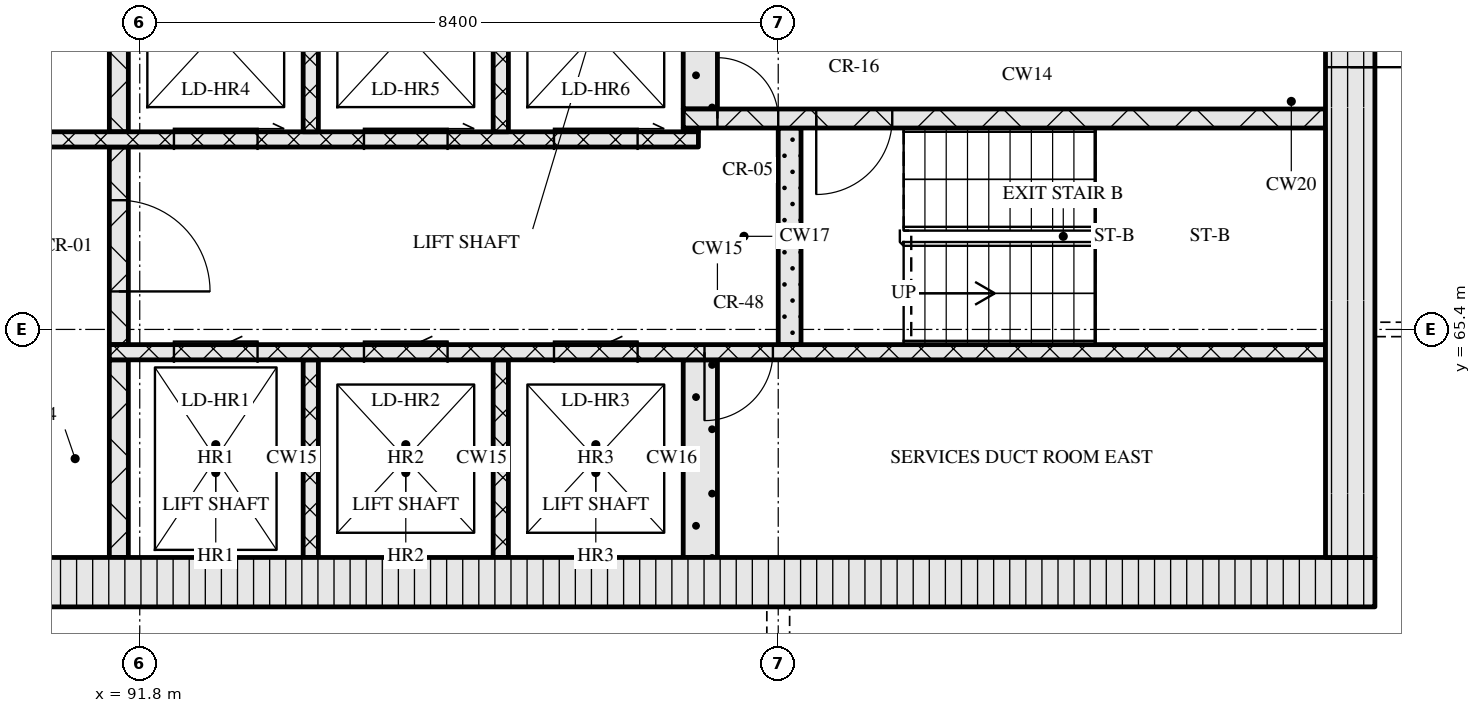
"""IFC4 building model, lengths in metres.
Left out: names, types, materials, properties, quantities, classifications, styles, units other than length and angle.
Written with IfcOpenShell. Run it as: python <this file> out.ifc"""

import sys

from ifc_helpers import new_model, si_unit, direction, frame, frame_2d, origin, place, context, subcontext, project, spatial, rectangle, extrude, element, fill, save


model = new_model("IFC4")
c1 = context("Model", 3, precision=1e-05, world=origin(), true_north=direction((0.0, 1.0)))
c2 = subcontext(c1, "Body", "Model", "MODEL_VIEW")
j1 = project(units=[si_unit("LENGTHUNIT", "METRE"), si_unit("PLANEANGLEUNIT", "RADIAN")], contexts=[c1])
p1 = place(None, origin())
s1 = spatial("IfcSite", under=j1, at=p1, CompositionType="ELEMENT")
p2 = place(p1, origin())
s2 = spatial("IfcBuilding", under=s1, at=p2, CompositionType="ELEMENT")
p3 = place(p2, frame((0.0, 0.0, 248.7)))
s3 = spatial("IfcBuildingStorey", under=s2, at=p3, CompositionType="ELEMENT", Elevation=248.7)
p4 = place(p3, frame((67.15, 62.075, 0.0), z_axis=(0.0, 0.0, 1.0), x_axis=(1.0, 0.0, 0.0)))
e1 = element("IfcWall", 1, at=p4, inside=s3, PredefinedType="SOLIDWALL", context=c2, shape_type="SweptSolid", body=[
    extrude(rectangle(XDim=40.9, YDim=0.65, at=frame_2d((20.45, 0.0))), origin(), (0.0, 0.0, 1.0), 3.3),
])
p5 = place(p4, frame((20.8, 0.0, 0.0)))
e2 = element("IfcOpeningElement", 2, at=p5, cuts=e1, PredefinedType="OPENING", context=c2, shape_type="SweptSolid", body=[
    extrude(rectangle(XDim=1.8, YDim=2.1, at=frame_2d((0.9, 1.05))), frame((0.0, 0.335, 0.0), z_axis=(0.0, -1.0, 0.0), x_axis=(1.0, 0.0, 0.0)), (0.0, 0.0, 1.0), 0.67),
])
p6 = place(p3, frame((107.725, 62.4, 0.0), z_axis=(0.0, 0.0, 1.0), x_axis=(0.0, 1.0, 0.0)))
e3 = element("IfcWall", 3, at=p6, inside=s3, PredefinedType="SOLIDWALL", context=c2, shape_type="SweptSolid", body=[
    extrude(rectangle(XDim=12.0, YDim=0.65, at=frame_2d((6.0, 0.0))), origin(), (0.0, 0.0, 1.0), 3.3),
])
p7 = place(p6, frame((6.45, 0.0, 0.0)))
e4 = element("IfcOpeningElement", 4, at=p7, cuts=e3, PredefinedType="OPENING", context=c2, shape_type="SweptSolid", body=[
    extrude(rectangle(XDim=1.2, YDim=2.1, at=frame_2d((0.6, 1.05))), frame((0.0, 0.335, 0.0), z_axis=(0.0, -1.0, 0.0), x_axis=(1.0, 0.0, 0.0)), (0.0, 0.0, 1.0), 0.67),
])
p8 = place(p3, frame((91.525, 62.4, 0.0), z_axis=(0.0, 0.0, 1.0), x_axis=(0.0, 1.0, 0.0)))
e5 = element("IfcWall", 5, at=p8, inside=s3, PredefinedType="SOLIDWALL", context=c2, shape_type="SweptSolid", body=[
    extrude(rectangle(XDim=2.6, YDim=0.25, at=frame_2d((1.3, 0.0))), origin(), (0.0, 0.0, 1.0), 3.3),
])
for number, where, z_axis, x_axis in (
    (6, (94.05, 62.4, 0.0), (0.0, 0.0, 1.0), (0.0, 1.0, 0.0)),
    (7, (96.55, 62.4, 0.0), (0.0, 0.0, 1.0), (0.0, 1.0, 0.0)),
):
    element("IfcWall", number, at=place(p3, frame(where, z_axis=z_axis, x_axis=x_axis)), inside=s3, PredefinedType="SOLIDWALL", context=c2, shape_type="SweptSolid", body=[
        extrude(rectangle(XDim=2.6, YDim=0.2, at=frame_2d((1.3, 0.0))), origin(), (0.0, 0.0, 1.0), 3.3),
    ])
p9 = place(p3, frame((99.175, 62.4, 0.0), z_axis=(0.0, 0.0, 1.0), x_axis=(0.0, 1.0, 0.0)))
e8 = element("IfcWall", 8, at=p9, inside=s3, PredefinedType="SOLIDWALL", context=c2, shape_type="SweptSolid", body=[
    extrude(rectangle(XDim=2.6, YDim=0.45, at=frame_2d((1.3, 0.0))), origin(), (0.0, 0.0, 1.0), 3.3),
])
p10 = place(p3, frame((91.4, 65.1, 0.0), z_axis=(0.0, 0.0, 1.0), x_axis=(1.0, 0.0, 0.0)))
e9 = element("IfcWall", 9, at=p10, inside=s3, PredefinedType="SOLIDWALL", context=c2, shape_type="SweptSolid", body=[
    extrude(rectangle(XDim=16.0, YDim=0.2, at=frame_2d((8.0, 0.0))), origin(), (0.0, 0.0, 1.0), 3.3),
])
p11 = place(p10, frame((0.85, 0.0, 0.0)))
e10 = element("IfcOpeningElement", 10, at=p11, cuts=e9, PredefinedType="OPENING", context=c2, shape_type="SweptSolid", body=[
    extrude(rectangle(XDim=1.1, YDim=2.1, at=frame_2d((0.55, 1.05))), frame((0.0, 0.11, 0.0), z_axis=(0.0, -1.0, 0.0), x_axis=(1.0, 0.0, 0.0)), (0.0, 0.0, 1.0), 0.22),
])
p12 = place(p10, frame((3.35, 0.0, 0.0)))
e11 = element("IfcOpeningElement", 11, at=p12, cuts=e9, PredefinedType="OPENING", context=c2, shape_type="SweptSolid", body=[
    extrude(rectangle(XDim=1.1, YDim=2.1, at=frame_2d((0.55, 1.05))), frame((0.0, 0.11, 0.0), z_axis=(0.0, -1.0, 0.0), x_axis=(1.0, 0.0, 0.0)), (0.0, 0.0, 1.0), 0.22),
])
p13 = place(p10, frame((5.85, 0.0, 0.0)))
e12 = element("IfcOpeningElement", 12, at=p13, cuts=e9, PredefinedType="OPENING", context=c2, shape_type="SweptSolid", body=[
    extrude(rectangle(XDim=1.1, YDim=2.1, at=frame_2d((0.55, 1.05))), frame((0.0, 0.11, 0.0), z_axis=(0.0, -1.0, 0.0), x_axis=(1.0, 0.0, 0.0)), (0.0, 0.0, 1.0), 0.22),
])
p14 = place(p10, frame((7.83, 0.0, 0.0)))
e13 = element("IfcOpeningElement", 13, at=p14, cuts=e9, PredefinedType="OPENING", context=c2, shape_type="SweptSolid", body=[
    extrude(rectangle(XDim=0.9, YDim=2.1, at=frame_2d((0.45, 1.05))), frame((0.0, 0.11, 0.0), z_axis=(0.0, -1.0, 0.0), x_axis=(1.0, 0.0, 0.0)), (0.0, 0.0, 1.0), 0.22),
])
p15 = place(p3, frame((91.525, 65.2, 0.0), z_axis=(0.0, 0.0, 1.0), x_axis=(0.0, 1.0, 0.0)))
e14 = element("IfcWall", 14, at=p15, inside=s3, PredefinedType="SOLIDWALL", context=c2, shape_type="SweptSolid", body=[
    extrude(rectangle(XDim=2.6, YDim=0.25, at=frame_2d((1.3, 0.0))), origin(), (0.0, 0.0, 1.0), 3.3),
])
p16 = place(p15, frame((0.7, 0.0, 0.0)))
e15 = element("IfcOpeningElement", 15, at=p16, cuts=e14, PredefinedType="OPENING", context=c2, shape_type="SweptSolid", body=[
    extrude(rectangle(XDim=1.2, YDim=2.1, at=frame_2d((0.6, 1.05))), frame((0.0, 0.135, 0.0), z_axis=(0.0, -1.0, 0.0), x_axis=(1.0, 0.0, 0.0)), (0.0, 0.0, 1.0), 0.27),
])
p17 = place(p3, frame((100.35, 65.2, 0.0), z_axis=(0.0, 0.0, 1.0), x_axis=(0.0, 1.0, 0.0)))
e16 = element("IfcWall", 16, at=p17, inside=s3, PredefinedType="SOLIDWALL", context=c2, shape_type="SweptSolid", body=[
    extrude(rectangle(XDim=2.85, YDim=0.3, at=frame_2d((1.425, 0.0))), origin(), (0.0, 0.0, 1.0), 3.3),
])
p18 = place(p3, frame((76.05, 67.9, 0.0), z_axis=(0.0, 0.0, 1.0), x_axis=(1.0, 0.0, 0.0)))
e17 = element("IfcWall", 17, at=p18, inside=s3, PredefinedType="SOLIDWALL", context=c2, shape_type="SweptSolid", body=[
    extrude(rectangle(XDim=23.1, YDim=0.2, at=frame_2d((11.55, 0.0))), origin(), (0.0, 0.0, 1.0), 3.3),
])
p19 = place(p18, frame((1.95, 0.0, 0.0)))
e18 = element("IfcOpeningElement", 18, at=p19, cuts=e17, PredefinedType="OPENING", context=c2, shape_type="SweptSolid", body=[
    extrude(rectangle(XDim=0.9, YDim=2.1, at=frame_2d((0.45, 1.05))), frame((0.0, 0.11, 0.0), z_axis=(0.0, -1.0, 0.0), x_axis=(1.0, 0.0, 0.0)), (0.0, 0.0, 1.0), 0.22),
])
p20 = place(p18, frame((5.66, 0.0, 0.0)))
e19 = element("IfcOpeningElement", 19, at=p20, cuts=e17, PredefinedType="OPENING", context=c2, shape_type="SweptSolid", body=[
    extrude(rectangle(XDim=0.9, YDim=2.1, at=frame_2d((0.45, 1.05))), frame((0.0, 0.11, 0.0), z_axis=(0.0, -1.0, 0.0), x_axis=(1.0, 0.0, 0.0)), (0.0, 0.0, 1.0), 0.22),
])
p21 = place(p18, frame((9.7, 0.0, 0.0)))
e20 = element("IfcOpeningElement", 20, at=p21, cuts=e17, PredefinedType="OPENING", context=c2, shape_type="SweptSolid", body=[
    extrude(rectangle(XDim=0.9, YDim=2.1, at=frame_2d((0.45, 1.05))), frame((0.0, 0.11, 0.0), z_axis=(0.0, -1.0, 0.0), x_axis=(1.0, 0.0, 0.0)), (0.0, 0.0, 1.0), 0.22),
])
p22 = place(p18, frame((13.55, 0.0, 0.0)))
e21 = element("IfcOpeningElement", 21, at=p22, cuts=e17, PredefinedType="OPENING", context=c2, shape_type="SweptSolid", body=[
    extrude(rectangle(XDim=1.0, YDim=2.1, at=frame_2d((0.5, 1.05))), frame((0.0, 0.11, 0.0), z_axis=(0.0, -1.0, 0.0), x_axis=(1.0, 0.0, 0.0)), (0.0, 0.0, 1.0), 0.22),
])
p23 = place(p18, frame((16.2, 0.0, 0.0)))
e22 = element("IfcOpeningElement", 22, at=p23, cuts=e17, PredefinedType="OPENING", context=c2, shape_type="SweptSolid", body=[
    extrude(rectangle(XDim=1.1, YDim=2.1, at=frame_2d((0.55, 1.05))), frame((0.0, 0.11, 0.0), z_axis=(0.0, -1.0, 0.0), x_axis=(1.0, 0.0, 0.0)), (0.0, 0.0, 1.0), 0.22),
])
p24 = place(p18, frame((18.7, 0.0, 0.0)))
e23 = element("IfcOpeningElement", 23, at=p24, cuts=e17, PredefinedType="OPENING", context=c2, shape_type="SweptSolid", body=[
    extrude(rectangle(XDim=1.1, YDim=2.1, at=frame_2d((0.55, 1.05))), frame((0.0, 0.11, 0.0), z_axis=(0.0, -1.0, 0.0), x_axis=(1.0, 0.0, 0.0)), (0.0, 0.0, 1.0), 0.22),
])
p25 = place(p18, frame((21.2, 0.0, 0.0)))
e24 = element("IfcOpeningElement", 24, at=p25, cuts=e17, PredefinedType="OPENING", context=c2, shape_type="SweptSolid", body=[
    extrude(rectangle(XDim=1.1, YDim=2.1, at=frame_2d((0.55, 1.05))), frame((0.0, 0.11, 0.0), z_axis=(0.0, -1.0, 0.0), x_axis=(1.0, 0.0, 0.0)), (0.0, 0.0, 1.0), 0.22),
])
p26 = place(p3, frame((91.525, 68.0, 0.0), z_axis=(0.0, 0.0, 1.0), x_axis=(0.0, 1.0, 0.0)))
e25 = element("IfcWall", 25, at=p26, inside=s3, PredefinedType="SOLIDWALL", context=c2, shape_type="SweptSolid", body=[
    extrude(rectangle(XDim=2.6, YDim=0.25, at=frame_2d((1.3, 0.0))), origin(), (0.0, 0.0, 1.0), 3.3),
])
for number, where, z_axis, x_axis in (
    (26, (94.05, 68.0, 0.0), (0.0, 0.0, 1.0), (0.0, 1.0, 0.0)),
    (27, (96.55, 68.0, 0.0), (0.0, 0.0, 1.0), (0.0, 1.0, 0.0)),
):
    element("IfcWall", number, at=place(p3, frame(where, z_axis=z_axis, x_axis=x_axis)), inside=s3, PredefinedType="SOLIDWALL", context=c2, shape_type="SweptSolid", body=[
        extrude(rectangle(XDim=2.6, YDim=0.2, at=frame_2d((1.3, 0.0))), origin(), (0.0, 0.0, 1.0), 3.3),
    ])
p27 = place(p3, frame((98.95, 68.025, 0.0), z_axis=(0.0, 0.0, 1.0), x_axis=(1.0, 0.0, 0.0)))
e28 = element("IfcWall", 28, at=p27, inside=s3, PredefinedType="SOLIDWALL", context=c2, shape_type="SweptSolid", body=[
    extrude(rectangle(XDim=0.2, YDim=0.05, at=frame_2d((0.1, 0.0))), origin(), (0.0, 0.0, 1.0), 3.3),
])
p28 = place(p3, frame((98.95, 68.175, 0.0), z_axis=(0.0, 0.0, 1.0), x_axis=(1.0, 0.0, 0.0)))
e29 = element("IfcWall", 29, at=p28, inside=s3, PredefinedType="SOLIDWALL", context=c2, shape_type="SweptSolid", body=[
    extrude(rectangle(XDim=8.45, YDim=0.25, at=frame_2d((4.225, 0.0))), origin(), (0.0, 0.0, 1.0), 3.3),
])
p29 = place(p28, frame((0.45, 0.0, 0.0)))
e30 = element("IfcOpeningElement", 30, at=p29, cuts=e29, PredefinedType="OPENING", context=c2, shape_type="SweptSolid", body=[
    extrude(rectangle(XDim=0.8, YDim=2.1, at=frame_2d((0.4, 1.05))), frame((0.0, 0.135, 0.0), z_axis=(0.0, -1.0, 0.0), x_axis=(1.0, 0.0, 0.0)), (0.0, 0.0, 1.0), 0.27),
])
p30 = place(p28, frame((1.75, 0.0, 0.0)))
e31 = element("IfcOpeningElement", 31, at=p30, cuts=e29, PredefinedType="OPENING", context=c2, shape_type="SweptSolid", body=[
    extrude(rectangle(XDim=1.0, YDim=2.1, at=frame_2d((0.5, 1.05))), frame((0.0, 0.135, 0.0), z_axis=(0.0, -1.0, 0.0), x_axis=(1.0, 0.0, 0.0)), (0.0, 0.0, 1.0), 0.27),
])
p31 = place(p3, frame((99.175, 68.3, 0.0), z_axis=(0.0, 0.0, 1.0), x_axis=(0.0, 1.0, 0.0)))
e32 = element("IfcWall", 32, at=p31, inside=s3, PredefinedType="SOLIDWALL", context=c2, shape_type="SweptSolid", body=[
    extrude(rectangle(XDim=2.3, YDim=0.45, at=frame_2d((1.15, 0.0))), origin(), (0.0, 0.0, 1.0), 3.3),
])
p32 = place(p11, origin())
e33 = element("IfcDoor", 33, at=p32, inside=s3, OperationType="SLIDING_TO_LEFT", PredefinedType="DOOR", context=c2, shape_type="SweptSolid", body=[
    extrude(rectangle(XDim=1.1, YDim=2.1, at=frame_2d((0.55, 1.05))), frame((0.0, 0.025, 0.0), z_axis=(0.0, -1.0, 0.0), x_axis=(1.0, 0.0, 0.0)), (0.0, 0.0, 1.0), 0.05),
])
fill(e10, e33)
p33 = place(p12, origin())
e34 = element("IfcDoor", 34, at=p33, inside=s3, OperationType="SLIDING_TO_LEFT", PredefinedType="DOOR", context=c2, shape_type="SweptSolid", body=[
    extrude(rectangle(XDim=1.1, YDim=2.1, at=frame_2d((0.55, 1.05))), frame((0.0, 0.025, 0.0), z_axis=(0.0, -1.0, 0.0), x_axis=(1.0, 0.0, 0.0)), (0.0, 0.0, 1.0), 0.05),
])
fill(e11, e34)
p34 = place(p13, origin())
e35 = element("IfcDoor", 35, at=p34, inside=s3, OperationType="SLIDING_TO_LEFT", PredefinedType="DOOR", context=c2, shape_type="SweptSolid", body=[
    extrude(rectangle(XDim=1.1, YDim=2.1, at=frame_2d((0.55, 1.05))), frame((0.0, 0.025, 0.0), z_axis=(0.0, -1.0, 0.0), x_axis=(1.0, 0.0, 0.0)), (0.0, 0.0, 1.0), 0.05),
])
fill(e12, e35)
p35 = place(p14, origin())
e36 = element("IfcDoor", 36, at=p35, inside=s3, OperationType="SINGLE_SWING_RIGHT", PredefinedType="DOOR", context=c2, shape_type="SweptSolid", body=[
    extrude(rectangle(XDim=0.9, YDim=2.1, at=frame_2d((0.45, 1.05))), frame((0.0, 0.025, 0.0), z_axis=(0.0, -1.0, 0.0), x_axis=(1.0, 0.0, 0.0)), (0.0, 0.0, 1.0), 0.05),
])
fill(e13, e36)
p36 = place(p16, origin())
e37 = element("IfcDoor", 37, at=p36, inside=s3, OperationType="SINGLE_SWING_RIGHT", PredefinedType="DOOR", context=c2, shape_type="SweptSolid", body=[
    extrude(rectangle(XDim=1.2, YDim=2.1, at=frame_2d((0.6, 1.05))), frame((0.0, 0.025, 0.0), z_axis=(0.0, -1.0, 0.0), x_axis=(1.0, 0.0, 0.0)), (0.0, 0.0, 1.0), 0.05),
])
fill(e15, e37)
p37 = place(p23, origin())
e38 = element("IfcDoor", 38, at=p37, inside=s3, OperationType="SLIDING_TO_RIGHT", PredefinedType="DOOR", context=c2, shape_type="SweptSolid", body=[
    extrude(rectangle(XDim=1.1, YDim=2.1, at=frame_2d((0.55, 1.05))), frame((0.0, 0.025, 0.0), z_axis=(0.0, -1.0, 0.0), x_axis=(1.0, 0.0, 0.0)), (0.0, 0.0, 1.0), 0.05),
])
fill(e22, e38)
p38 = place(p24, origin())
e39 = element("IfcDoor", 39, at=p38, inside=s3, OperationType="SLIDING_TO_RIGHT", PredefinedType="DOOR", context=c2, shape_type="SweptSolid", body=[
    extrude(rectangle(XDim=1.1, YDim=2.1, at=frame_2d((0.55, 1.05))), frame((0.0, 0.025, 0.0), z_axis=(0.0, -1.0, 0.0), x_axis=(1.0, 0.0, 0.0)), (0.0, 0.0, 1.0), 0.05),
])
fill(e23, e39)
p39 = place(p25, origin())
e40 = element("IfcDoor", 40, at=p39, inside=s3, OperationType="SLIDING_TO_RIGHT", PredefinedType="DOOR", context=c2, shape_type="SweptSolid", body=[
    extrude(rectangle(XDim=1.1, YDim=2.1, at=frame_2d((0.55, 1.05))), frame((0.0, 0.025, 0.0), z_axis=(0.0, -1.0, 0.0), x_axis=(1.0, 0.0, 0.0)), (0.0, 0.0, 1.0), 0.05),
])
fill(e24, e40)
p40 = place(p29, origin())
e41 = element("IfcDoor", 41, at=p40, inside=s3, OperationType="SINGLE_SWING_LEFT", PredefinedType="DOOR", context=c2, shape_type="SweptSolid", body=[
    extrude(rectangle(XDim=0.8, YDim=2.1, at=frame_2d((0.4, 1.05))), frame((0.0, 0.025, 0.0), z_axis=(0.0, -1.0, 0.0), x_axis=(1.0, 0.0, 0.0)), (0.0, 0.0, 1.0), 0.05),
])
fill(e30, e41)
p41 = place(p30, origin())
e42 = element("IfcDoor", 42, at=p41, inside=s3, OperationType="SINGLE_SWING_RIGHT", PredefinedType="DOOR", context=c2, shape_type="SweptSolid", body=[
    extrude(rectangle(XDim=1.0, YDim=2.1, at=frame_2d((0.5, 1.05))), frame((0.0, 0.025, 0.0), z_axis=(0.0, -1.0, 0.0), x_axis=(1.0, 0.0, 0.0)), (0.0, 0.0, 1.0), 0.05),
])
fill(e31, e42)
p42 = place(p7, origin())
e43 = element("IfcDoor", 43, at=p42, inside=s3, OperationType="SINGLE_SWING_RIGHT", PredefinedType="DOOR", context=c2, shape_type="SweptSolid", body=[
    extrude(rectangle(XDim=1.2, YDim=2.1, at=frame_2d((0.6, 1.05))), frame((0.0, 0.025, 0.0), z_axis=(0.0, -1.0, 0.0), x_axis=(1.0, 0.0, 0.0)), (0.0, 0.0, 1.0), 0.05),
])
fill(e4, e43)
save(model, sys.argv[1])
